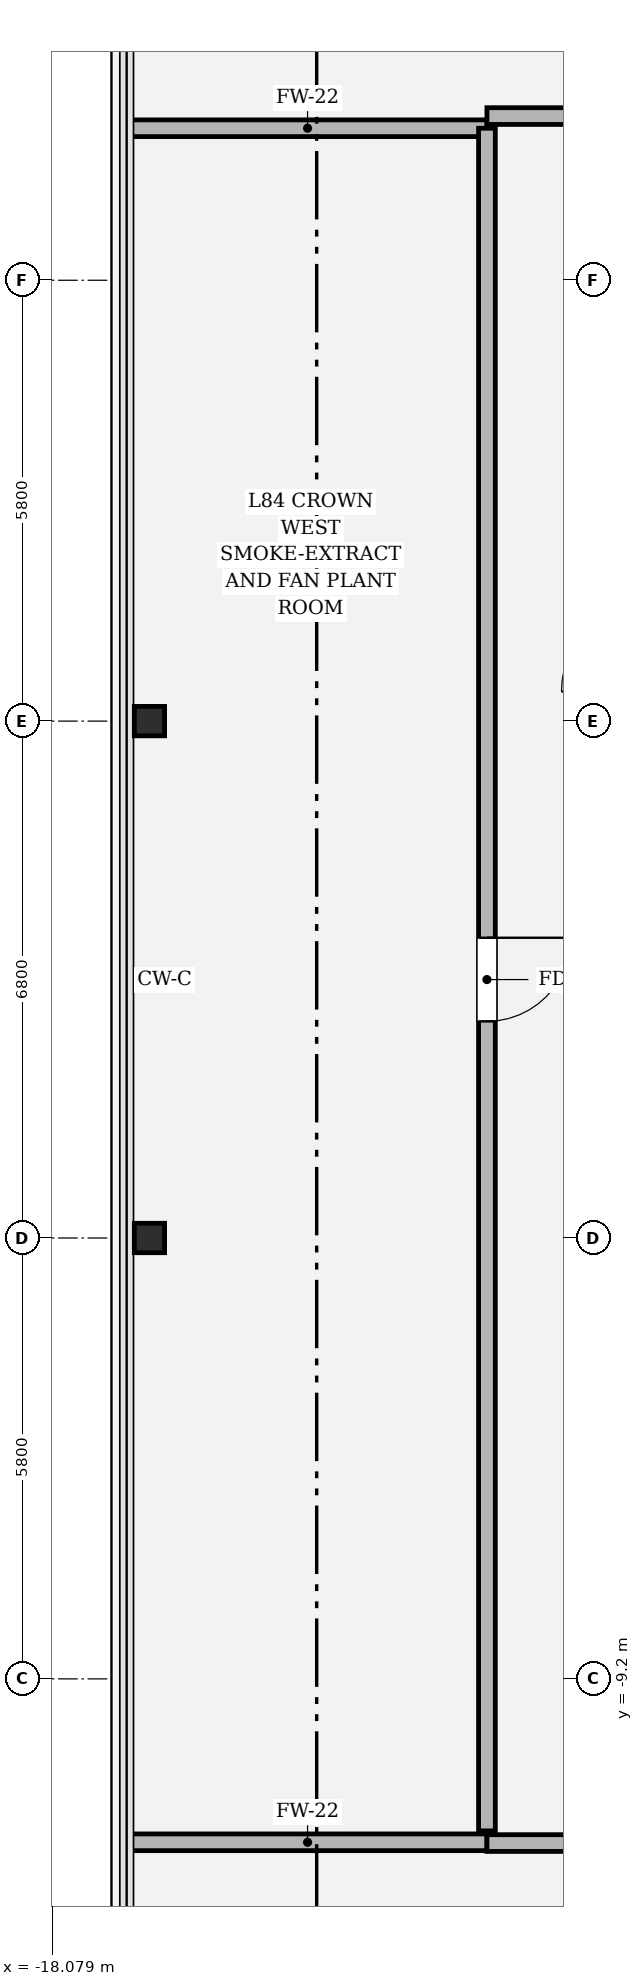
"""IFC4 building model, lengths in metres.
Left out: names, types, materials, properties, quantities, classifications, styles, units other than length and angle.
Written with IfcOpenShell. Run it as: python <this file> out.ifc"""

import sys

from ifc_helpers import new_model, si_unit, direction, frame, frame_2d, origin, origin_2d, place, context, subcontext, project, spatial, rectangle, i_section, extrude, element, fill, save


model = new_model("IFC4")
c1 = context("Model", 3, precision=1e-05, world=origin(), true_north=direction((0.0, 1.0)))
c2 = subcontext(c1, "Body", "Model", "MODEL_VIEW")
j1 = project(units=[si_unit("LENGTHUNIT", "METRE"), si_unit("PLANEANGLEUNIT", "RADIAN")], contexts=[c1])
p1 = place(None, origin())
s1 = spatial("IfcSite", under=j1, at=p1, CompositionType="ELEMENT")
p2 = place(p1, origin())
s2 = spatial("IfcBuilding", under=s1, at=p2, CompositionType="ELEMENT")
p3 = place(p2, frame((0.0, 0.0, 357.3)))
s3 = spatial("IfcBuildingStorey", under=s2, at=p3, CompositionType="ELEMENT", Elevation=357.3)
for number, where, z_axis, x_axis in (
    (1, (-16.8, -3.4, 0.0), (0.0, 0.0, 1.0), (1.0, 0.0, 0.0)),
    (2, (-16.8, 3.4, 0.0), (0.0, 0.0, 1.0), (1.0, 0.0, 0.0)),
):
    element("IfcColumn", number, at=place(p3, frame(where, z_axis=z_axis, x_axis=x_axis)), inside=s3, PredefinedType="COLUMN", context=c2, shape_type="SweptSolid", body=[
        extrude(i_section(OverallWidth=0.398, OverallDepth=0.387, WebThickness=0.021, FlangeThickness=0.033, FilletRadius=0.018, at=origin_2d()), origin(), (0.0, 0.0, 1.0), 4.498),
    ])
p4 = place(p3, frame((-17.08, -11.35, 0.0), z_axis=(0.0, 0.0, 1.0), x_axis=(1.0, 0.0, 0.0)))
e3 = element("IfcWall", 3, at=p4, inside=s3, PredefinedType="SOLIDWALL", context=c2, shape_type="SweptSolid", body=[
    extrude(rectangle(XDim=4.72, YDim=0.22, at=frame_2d((2.36, 0.0))), origin(), (0.0, 0.0, 1.0), 2.934),
])
p5 = place(p3, frame((-12.36, -11.36, 0.0), z_axis=(0.0, 0.0, 1.0), x_axis=(1.0, 0.0, 0.0)))
e4 = element("IfcWall", 4, at=p5, inside=s3, PredefinedType="SOLIDWALL", context=c2, shape_type="SweptSolid", body=[
    extrude(rectangle(XDim=24.72, YDim=0.22, at=frame_2d((12.36, 0.0))), origin(), (0.0, 0.0, 1.0), 2.934),
])
p6 = place(p5, frame((11.81, 0.0, 0.0)))
e5 = element("IfcOpeningElement", 5, at=p6, cuts=e4, PredefinedType="OPENING", context=c2, shape_type="SweptSolid", body=[
    extrude(rectangle(XDim=1.1, YDim=2.2, at=frame_2d((0.55, 1.1))), frame((0.0, 0.12, 0.0), z_axis=(0.0, -1.0, 0.0), x_axis=(1.0, 0.0, 0.0)), (0.0, 0.0, 1.0), 0.24),
])
p7 = place(p3, frame((-17.08, 11.2, 0.0), z_axis=(0.0, 0.0, 1.0), x_axis=(1.0, 0.0, 0.0)))
e6 = element("IfcWall", 6, at=p7, inside=s3, PredefinedType="SOLIDWALL", context=c2, shape_type="SweptSolid", body=[
    extrude(rectangle(XDim=4.72, YDim=0.22, at=frame_2d((2.36, 0.0))), origin(), (0.0, 0.0, 1.0), 2.934),
])
p8 = place(p3, frame((-12.36, 11.2, 0.0), z_axis=(0.0, 0.0, 1.0), x_axis=(0.0, -1.0, 0.0)))
e7 = element("IfcWall", 7, at=p8, inside=s3, PredefinedType="SOLIDWALL", context=c2, shape_type="SweptSolid", body=[
    extrude(rectangle(XDim=22.4, YDim=0.22, at=frame_2d((11.2, 0.0))), origin(), (0.0, 0.0, 1.0), 2.934),
])
p9 = place(p8, frame((10.65, 0.0, 0.0)))
e8 = element("IfcOpeningElement", 8, at=p9, cuts=e7, PredefinedType="OPENING", context=c2, shape_type="SweptSolid", body=[
    extrude(rectangle(XDim=1.1, YDim=2.2, at=frame_2d((0.55, 1.1))), frame((0.0, 0.12, 0.0), z_axis=(0.0, -1.0, 0.0), x_axis=(1.0, 0.0, 0.0)), (0.0, 0.0, 1.0), 0.24),
])
p10 = place(p3, frame((12.36, 11.36, 0.0), z_axis=(0.0, 0.0, 1.0), x_axis=(-1.0, 0.0, 0.0)))
e9 = element("IfcWall", 9, at=p10, inside=s3, PredefinedType="SOLIDWALL", context=c2, shape_type="SweptSolid", body=[
    extrude(rectangle(XDim=24.72, YDim=0.22, at=frame_2d((12.36, 0.0))), origin(), (0.0, 0.0, 1.0), 2.934),
])
p11 = place(p10, frame((11.81, 0.0, 0.0)))
e10 = element("IfcOpeningElement", 10, at=p11, cuts=e9, PredefinedType="OPENING", context=c2, shape_type="SweptSolid", body=[
    extrude(rectangle(XDim=1.1, YDim=2.2, at=frame_2d((0.55, 1.1))), frame((0.0, 0.12, 0.0), z_axis=(0.0, -1.0, 0.0), x_axis=(1.0, 0.0, 0.0)), (0.0, 0.0, 1.0), 0.24),
])
p12 = place(p9, origin())
e11 = element("IfcDoor", 11, at=p12, inside=s3, OperationType="SINGLE_SWING_LEFT", PredefinedType="DOOR", context=c2, shape_type="SweptSolid", body=[
    extrude(rectangle(XDim=1.1, YDim=2.2, at=frame_2d((0.55, 1.1))), frame((0.0, 0.025, 0.0), z_axis=(0.0, -1.0, 0.0), x_axis=(1.0, 0.0, 0.0)), (0.0, 0.0, 1.0), 0.05),
])
fill(e8, e11)
save(model, sys.argv[1])
